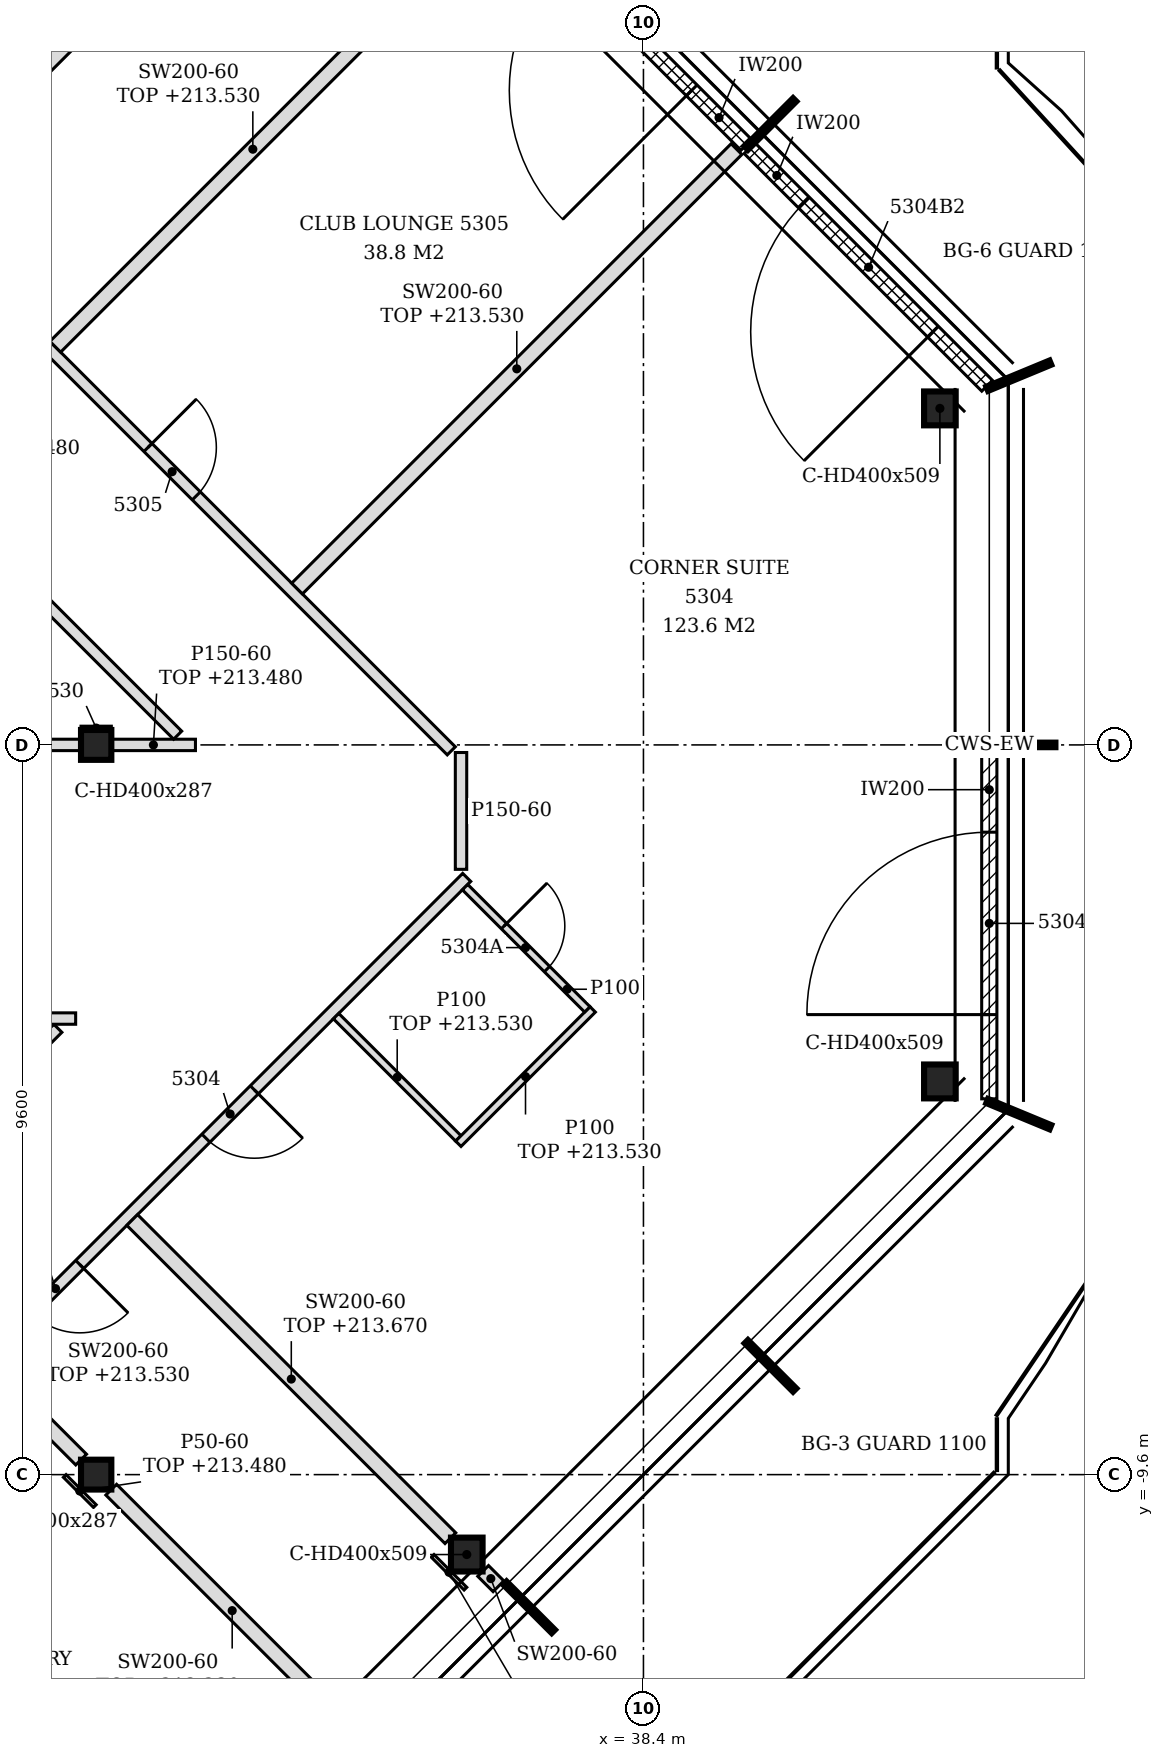
"""IFC4 building model, lengths in metres.
Left out: names, types, materials, properties, quantities, classifications, styles, units other than length and angle.
Written with IfcOpenShell. Run it as: python <this file> out.ifc"""

import sys

from ifc_helpers import new_model, si_unit, direction, frame, frame_2d, origin, origin_2d, place, context, subcontext, project, spatial, polyline, rectangle, i_section, outline, extrude, element, fill, save


model = new_model("IFC4")
c1 = context("Model", 3, precision=1e-05, world=origin(), true_north=direction((0.0, 1.0)))
c2 = subcontext(c1, "Body", "Model", "MODEL_VIEW")
j1 = project(units=[si_unit("LENGTHUNIT", "METRE"), si_unit("PLANEANGLEUNIT", "RADIAN")], contexts=[c1])
p1 = place(None, origin())
s1 = spatial("IfcSite", under=j1, at=p1, CompositionType="ELEMENT")
p2 = place(p1, origin())
s2 = spatial("IfcBuilding", under=s1, at=p2, CompositionType="ELEMENT")
p3 = place(p2, frame((0.0, 0.0, 210.6)))
s3 = spatial("IfcBuildingStorey", under=s2, at=p3, CompositionType="ELEMENT", Elevation=210.6)
for number, where, z_axis, x_axis in (
    (1, (36.076, -10.652, -0.15), (0.0, 0.0, 1.0), (1.0, 0.0, 0.0)),
    (2, (42.3, -4.427, -0.15), (0.0, 0.0, 1.0), (1.0, 0.0, 0.0)),
    (3, (42.3, 4.427, -0.15), (0.0, 0.0, 1.0), (1.0, 0.0, 0.0)),
):
    element("IfcColumn", number, at=place(p3, frame(where, z_axis=z_axis, x_axis=x_axis)), inside=s3, PredefinedType="COLUMN", context=c2, shape_type="SweptSolid", body=[
        extrude(i_section(OverallWidth=0.416, OverallDepth=0.446, WebThickness=0.039, FlangeThickness=0.063, FilletRadius=0.015, at=origin_2d()), origin(), (0.0, 0.0, 1.0), 3.6),
    ])
for number, where, z_axis, x_axis in (
    (4, (31.2, -9.6, -0.15), (0.0, 0.0, 1.0), (1.0, 0.0, 0.0)),
    (5, (31.2, 0.0, -0.15), (0.0, 0.0, 1.0), (1.0, 0.0, 0.0)),
):
    element("IfcColumn", number, at=place(p3, frame(where, z_axis=z_axis, x_axis=x_axis)), inside=s3, PredefinedType="COLUMN", context=c2, shape_type="SweptSolid", body=[
        extrude(i_section(OverallWidth=0.399, OverallDepth=0.393, WebThickness=0.023, FlangeThickness=0.037, FilletRadius=0.015, at=origin_2d()), origin(), (0.0, 0.0, 1.0), 3.6),
    ])
p4 = place(p3, frame((42.95, -4.656, 0.0), z_axis=(0.0, 0.0, 1.0), x_axis=(0.0, 1.0, 0.0)))
e6 = element("IfcWall", 6, at=p4, inside=s3, PredefinedType="NOTDEFINED", context=c2, shape_type="SweptSolid", body=[
    extrude(rectangle(XDim=4.626, YDim=0.2, at=frame_2d((2.313, 0.0))), origin(), (0.0, 0.0, 1.0), 3.45),
])
p5 = place(p4, frame((1.108, 0.0, 0.0)))
e7 = element("IfcOpeningElement", 7, at=p5, cuts=e6, PredefinedType="OPENING", context=c2, shape_type="SweptSolid", body=[
    extrude(rectangle(XDim=2.4, YDim=2.4, at=frame_2d((1.2, 1.2))), frame((0.0, 0.11, 0.0), z_axis=(0.0, -1.0, 0.0), x_axis=(1.0, 0.0, 0.0)), (0.0, 0.0, 1.0), 0.22),
])
p6 = place(p3, frame((42.922, 4.725, 0.0), z_axis=(0.0, 0.0, 1.0), x_axis=(-0.707079168996, 0.707134392299, 0.0)))
e8 = element("IfcWall", 8, at=p6, inside=s3, PredefinedType="NOTDEFINED", context=c2, shape_type="SweptSolid", body=[
    extrude(rectangle(XDim=4.421, YDim=0.2, at=frame_2d((2.21, 0.0))), origin(), (0.0, 0.0, 1.0), 3.45),
])
p7 = place(p6, frame((1.005, 0.0, 0.0)))
e9 = element("IfcOpeningElement", 9, at=p7, cuts=e8, PredefinedType="OPENING", context=c2, shape_type="SweptSolid", body=[
    extrude(rectangle(XDim=2.4, YDim=2.4, at=frame_2d((1.2, 1.2))), frame((0.0, 0.11, 0.0), z_axis=(0.0, -1.0, 0.0), x_axis=(1.0, 0.0, 0.0)), (0.0, 0.0, 1.0), 0.22),
])
p8 = place(p3, frame((39.753, 7.893, 0.0), z_axis=(0.0, 0.0, 1.0), x_axis=(-0.707106781187, 0.707106781187, 0.0)))
e10 = element("IfcWall", 10, at=p8, inside=s3, PredefinedType="NOTDEFINED", context=c2, shape_type="SweptSolid", body=[
    extrude(rectangle(XDim=4.431, YDim=0.2, at=frame_2d((2.215, 0.0))), origin(), (0.0, 0.0, 1.0), 3.45),
])
p9 = place(p8, frame((1.016, 0.0, 0.0)))
e11 = element("IfcOpeningElement", 11, at=p9, cuts=e10, PredefinedType="OPENING", context=c2, shape_type="SweptSolid", body=[
    extrude(rectangle(XDim=2.4, YDim=2.4, at=frame_2d((1.2, 1.2))), frame((0.0, 0.11, 0.0), z_axis=(0.0, -1.0, 0.0), x_axis=(1.0, 0.0, 0.0)), (0.0, 0.0, 1.0), 0.22),
])
p10 = place(p3, frame((21.146, -16.672, 0.0), z_axis=(0.0, 0.0, 1.0), x_axis=(0.707100999376, 0.70711256295, 0.0)))
e12 = element("IfcWall", 12, at=p10, inside=s3, PredefinedType="PARTITIONING", context=c2, shape_type="SweptSolid", body=[
    extrude(rectangle(XDim=21.113, YDim=0.15, at=frame_2d((10.556, 0.0))), origin(), (0.0, 0.0, 1.0), 2.88),
])
p11 = place(p10, frame((2.466, 0.0, 0.0)))
e13 = element("IfcOpeningElement", 13, at=p11, cuts=e12, PredefinedType="OPENING", context=c2, shape_type="SweptSolid", body=[
    extrude(rectangle(XDim=0.9, YDim=2.1, at=frame_2d((0.45, 1.05))), frame((0.0, 0.085, 0.0), z_axis=(0.0, -1.0, 0.0), x_axis=(1.0, 0.0, 0.0)), (0.0, 0.0, 1.0), 0.17),
])
p12 = place(p10, frame((8.611, 0.0, 0.0)))
e14 = element("IfcOpeningElement", 14, at=p12, cuts=e12, PredefinedType="OPENING", context=c2, shape_type="SweptSolid", body=[
    extrude(rectangle(XDim=0.9, YDim=2.1, at=frame_2d((0.45, 1.05))), frame((0.0, 0.085, 0.0), z_axis=(0.0, -1.0, 0.0), x_axis=(1.0, 0.0, 0.0)), (0.0, 0.0, 1.0), 0.17),
])
p13 = place(p10, frame((13.012, 0.0, 0.0)))
e15 = element("IfcOpeningElement", 15, at=p13, cuts=e12, PredefinedType="OPENING", context=c2, shape_type="SweptSolid", body=[
    extrude(rectangle(XDim=0.9, YDim=2.1, at=frame_2d((0.45, 1.05))), frame((0.0, 0.085, 0.0), z_axis=(0.0, -1.0, 0.0), x_axis=(1.0, 0.0, 0.0)), (0.0, 0.0, 1.0), 0.17),
])
p14 = place(p10, frame((16.261, 0.0, 0.0)))
e16 = element("IfcOpeningElement", 16, at=p14, cuts=e12, PredefinedType="OPENING", context=c2, shape_type="SweptSolid", body=[
    extrude(rectangle(XDim=0.9, YDim=2.1, at=frame_2d((0.45, 1.05))), frame((0.0, 0.085, 0.0), z_axis=(0.0, -1.0, 0.0), x_axis=(1.0, 0.0, 0.0)), (0.0, 0.0, 1.0), 0.17),
])
p15 = place(p3, frame((34.581, -12.981, 0.0), z_axis=(0.0, 0.0, 1.0), x_axis=(-0.707133900936, 0.707079660397, 0.0)))
e17 = element("IfcWall", 17, at=p15, inside=s3, PredefinedType="PARTITIONING", context=c2, shape_type="SweptSolid", body=[
    extrude(rectangle(XDim=4.501, YDim=0.2, at=frame_2d((2.25, 0.0))), origin(), (0.0, 0.0, 1.0), 2.63),
])
p16 = place(p3, frame((36.493, -11.069, 0.0), z_axis=(0.0, 0.0, 1.0), x_axis=(-0.707534423513, 0.706678880075, 0.0)))
e18 = element("IfcWall", 18, at=p16, inside=s3, PredefinedType="PARTITIONING", context=c2, shape_type="SweptSolid", body=[
    extrude(rectangle(XDim=0.285, YDim=0.2, at=frame_2d((0.143, 0.0))), origin(), (0.0, 0.0, 1.0), 3.45),
])
p17 = place(p3, frame((35.86, -10.436, 0.0), z_axis=(0.0, 0.0, 1.0), x_axis=(-0.707106781187, 0.707106781187, 0.0)))
e19 = element("IfcWall", 19, at=p17, inside=s3, PredefinedType="PARTITIONING", context=c2, shape_type="SweptSolid", body=[
    extrude(rectangle(XDim=5.92, YDim=0.2, at=frame_2d((2.96, 0.0))), origin(), (0.0, 0.0, 1.0), 3.07),
])
p18 = place(p3, frame((31.002, -9.402, 0.0), z_axis=(0.0, 0.0, 1.0), x_axis=(-0.707106781187, 0.707106781187, 0.0)))
e20 = element("IfcWall", 20, at=p18, inside=s3, PredefinedType="PARTITIONING", context=c2, shape_type="SweptSolid", body=[
    extrude(rectangle(XDim=1.754, YDim=0.2, at=frame_2d((0.877, 0.0))), origin(), (0.0, 0.0, 1.0), 2.93),
])
p19 = place(p3, frame((26.151, -8.272, 0.0), z_axis=(0.0, 0.0, 1.0), x_axis=(0.707163762272, 0.707049795509, 0.0)))
e21 = element("IfcWall", 21, at=p19, inside=s3, PredefinedType="PARTITIONING", context=c2, shape_type="SweptSolid", body=[
    extrude(rectangle(XDim=6.427, YDim=0.15, at=frame_2d((3.213, 0.0))), origin(), (0.0, 0.0, 1.0), 2.88),
])
p20 = place(p3, frame((35.965, -5.177, 0.0), z_axis=(0.0, 0.0, 1.0), x_axis=(-0.707160441348, 0.707053116953, 0.0)))
e22 = element("IfcWall", 22, at=p20, inside=s3, PredefinedType="PARTITIONING", context=c2, shape_type="SweptSolid", body=[
    extrude(rectangle(XDim=2.275, YDim=0.1, at=frame_2d((1.137, 0.0))), origin(), (0.0, 0.0, 1.0), 2.93),
])
p21 = place(p3, frame((35.965, -5.247, 0.0), z_axis=(0.0, 0.0, 1.0), x_axis=(0.707155609469, 0.707057949532, 0.0)))
e23 = element("IfcWall", 23, at=p21, inside=s3, PredefinedType="PARTITIONING", context=c2, shape_type="SweptSolid", body=[
    extrude(rectangle(XDim=2.5, YDim=0.1, at=frame_2d((1.25, 0.0))), origin(), (0.0, 0.0, 1.0), 2.93),
])
p22 = place(p3, frame((19.125, -3.6, 0.0), z_axis=(0.0, 0.0, 1.0), x_axis=(1.0, 0.0, 0.0)))
e24 = element("IfcWall", 24, at=p22, inside=s3, PredefinedType="PARTITIONING", context=c2, shape_type="SweptSolid", body=[
    extrude(outline(polyline([(0.0, 0.0), (11.805, 0.0), (11.805, 3.45), (0.225, 3.45), (0.223, 2.83), (0.0, 2.83), (0.0, 0.0)])), frame((0.0, 0.075, 0.0), z_axis=(0.0, -1.0, 0.0), x_axis=(1.0, 0.0, 0.0)), (0.0, 0.0, 1.0), 0.15),
])
p23 = place(p22, frame((5.437, 0.0, 0.0)))
e25 = element("IfcOpeningElement", 25, at=p23, cuts=e24, PredefinedType="OPENING", context=c2, shape_type="SweptSolid", body=[
    extrude(rectangle(XDim=0.9, YDim=2.1, at=frame_2d((0.45, 1.05))), frame((0.0, 0.085, 0.0), z_axis=(0.0, -1.0, 0.0), x_axis=(1.0, 0.0, 0.0)), (0.0, 0.0, 1.0), 0.17),
])
p24 = place(p3, frame((37.662, -3.479, 0.0), z_axis=(0.0, 0.0, 1.0), x_axis=(-0.707160441348, 0.707053116953, 0.0)))
e26 = element("IfcWall", 26, at=p24, inside=s3, PredefinedType="PARTITIONING", context=c2, shape_type="SweptSolid", body=[
    extrude(rectangle(XDim=2.275, YDim=0.1, at=frame_2d((1.137, 0.0))), origin(), (0.0, 0.0, 1.0), 3.45),
])
p25 = place(p24, frame((0.75, 0.0, 0.0)))
e27 = element("IfcOpeningElement", 27, at=p25, cuts=e26, PredefinedType="OPENING", context=c2, shape_type="SweptSolid", body=[
    extrude(rectangle(XDim=0.8, YDim=2.1, at=frame_2d((0.4, 1.05))), frame((0.0, 0.06, 0.0), z_axis=(0.0, -1.0, 0.0), x_axis=(1.0, 0.0, 0.0)), (0.0, 0.0, 1.0), 0.12),
])
p26 = place(p3, frame((36.0, -1.637, 0.0), z_axis=(0.0, 0.0, 1.0), x_axis=(0.0, 1.0, 0.0)))
e28 = element("IfcWall", 28, at=p26, inside=s3, PredefinedType="PARTITIONING", context=c2, shape_type="SweptSolid", body=[
    extrude(outline(polyline([(0.0, 0.0), (1.537, 0.0), (1.537, 2.88), (1.532, 2.88), (1.53, 3.45), (0.0, 3.45), (0.0, 0.0)])), frame((0.0, 0.075, 0.0), z_axis=(0.0, -1.0, 0.0), x_axis=(1.0, 0.0, 0.0)), (0.0, 0.0, 1.0), 0.15),
])
p27 = place(p3, frame((35.872, -0.078, 0.0), z_axis=(0.0, 0.0, 1.0), x_axis=(-0.707113345155, 0.707100217157, 0.0)))
e29 = element("IfcWall", 29, at=p27, inside=s3, PredefinedType="PARTITIONING", context=c2, shape_type="SweptSolid", body=[
    extrude(rectangle(XDim=18.597, YDim=0.15, at=frame_2d((9.298, 0.0))), origin(), (0.0, 0.0, 1.0), 2.88),
])
p28 = place(p27, frame((4.744, 0.0, 0.0)))
e30 = element("IfcOpeningElement", 30, at=p28, cuts=e29, PredefinedType="OPENING", context=c2, shape_type="SweptSolid", body=[
    extrude(rectangle(XDim=0.9, YDim=2.1, at=frame_2d((0.45, 1.05))), frame((0.0, 0.085, 0.0), z_axis=(0.0, -1.0, 0.0), x_axis=(1.0, 0.0, 0.0)), (0.0, 0.0, 1.0), 0.17),
])
p29 = place(p27, frame((8.345, 0.0, 0.0)))
e31 = element("IfcOpeningElement", 31, at=p29, cuts=e29, PredefinedType="OPENING", context=c2, shape_type="SweptSolid", body=[
    extrude(rectangle(XDim=0.9, YDim=2.1, at=frame_2d((0.45, 1.05))), frame((0.0, 0.085, 0.0), z_axis=(0.0, -1.0, 0.0), x_axis=(1.0, 0.0, 0.0)), (0.0, 0.0, 1.0), 0.17),
])
p30 = place(p27, frame((12.746, 0.0, 0.0)))
e32 = element("IfcOpeningElement", 32, at=p30, cuts=e29, PredefinedType="OPENING", context=c2, shape_type="SweptSolid", body=[
    extrude(rectangle(XDim=0.9, YDim=2.1, at=frame_2d((0.45, 1.05))), frame((0.0, 0.085, 0.0), z_axis=(0.0, -1.0, 0.0), x_axis=(1.0, 0.0, 0.0)), (0.0, 0.0, 1.0), 0.17),
])
p31 = place(p3, frame((19.125, 0.0, 0.0), z_axis=(0.0, 0.0, 1.0), x_axis=(1.0, 0.0, 0.0)))
e33 = element("IfcWall", 33, at=p31, inside=s3, PredefinedType="PARTITIONING", context=c2, shape_type="SweptSolid", body=[
    extrude(outline(polyline([(0.0, 0.0), (11.875, 0.0), (11.875, 2.88), (0.225, 2.88), (0.223, 2.83), (0.0, 2.83), (0.0, 0.0)])), frame((0.0, 0.075, 0.0), z_axis=(0.0, -1.0, 0.0), x_axis=(1.0, 0.0, 0.0)), (0.0, 0.0, 1.0), 0.15),
])
p32 = place(p3, frame((31.399, 0.0, 0.0), z_axis=(0.0, 0.0, 1.0), x_axis=(1.0, 0.0, 0.0)))
e34 = element("IfcWall", 34, at=p32, inside=s3, PredefinedType="PARTITIONING", context=c2, shape_type="SweptSolid", body=[
    extrude(rectangle(XDim=1.107, YDim=0.15, at=frame_2d((0.553, 0.0))), origin(), (0.0, 0.0, 1.0), 2.88),
])
p33 = place(p3, frame((32.272, 0.128, 0.0), z_axis=(0.0, 0.0, 1.0), x_axis=(-0.707106781187, 0.707106781187, 0.0)))
e35 = element("IfcWall", 35, at=p33, inside=s3, PredefinedType="PARTITIONING", context=c2, shape_type="SweptSolid", body=[
    extrude(rectangle(XDim=18.207, YDim=0.15, at=frame_2d((9.103, 0.0))), origin(), (0.0, 0.0, 1.0), 2.88),
])
p34 = place(p33, frame((8.703, 0.0, 0.0)))
e36 = element("IfcOpeningElement", 36, at=p34, cuts=e35, PredefinedType="OPENING", context=c2, shape_type="SweptSolid", body=[
    extrude(rectangle(XDim=0.9, YDim=2.1, at=frame_2d((0.45, 1.05))), frame((0.0, 0.085, 0.0), z_axis=(0.0, -1.0, 0.0), x_axis=(1.0, 0.0, 0.0)), (0.0, 0.0, 1.0), 0.17),
])
p35 = place(p3, frame((33.843, 2.057, 0.0), z_axis=(0.0, 0.0, 1.0), x_axis=(0.70709185088, 0.707121711178, 0.0)))
e37 = element("IfcWall", 37, at=p35, inside=s3, PredefinedType="PARTITIONING", context=c2, shape_type="SweptSolid", body=[
    extrude(rectangle(XDim=8.176, YDim=0.2, at=frame_2d((4.088, 0.0))), origin(), (0.0, 0.0, 1.0), 2.93),
])
p36 = place(p3, frame((30.662, 5.238, 0.0), z_axis=(0.0, 0.0, 1.0), x_axis=(0.707106781187, 0.707106781187, 0.0)))
e38 = element("IfcWall", 38, at=p36, inside=s3, PredefinedType="PARTITIONING", context=c2, shape_type="SweptSolid", body=[
    extrude(rectangle(XDim=7.351, YDim=0.2, at=frame_2d((3.676, 0.0))), origin(), (0.0, 0.0, 1.0), 2.93),
])
p37 = place(p3, frame((28.75, 7.15, 0.0), z_axis=(0.0, 0.0, 1.0), x_axis=(0.7070684525, 0.707145107796, 0.0)))
e39 = element("IfcWall", 39, at=p37, inside=s3, PredefinedType="PARTITIONING", context=c2, shape_type="SweptSolid", body=[
    extrude(rectangle(XDim=3.185, YDim=0.2, at=frame_2d((1.592, 0.0))), origin(), (0.0, 0.0, 1.0), 2.93),
])
p38 = place(p3, frame((31.182, -10.014, 0.0), z_axis=(0.0, 0.0, 1.0), x_axis=(-0.707106781187, 0.707106781187, 0.0)))
e40 = element("IfcWall", 40, at=p38, inside=s3, PredefinedType="PARTITIONING", context=c2, shape_type="SweptSolid", body=[
    extrude(rectangle(XDim=0.56, YDim=0.05, at=frame_2d((0.28, 0.0))), origin(), (0.0, 0.0, 1.0), 2.88),
])
p39 = place(p3, frame((36.058, -11.1, 0.0), z_axis=(0.0, 0.0, 1.0), x_axis=(-0.707307009627, 0.706906496032, 0.0)))
e41 = element("IfcWall", 41, at=p39, inside=s3, PredefinedType="PARTITIONING", context=c2, shape_type="SweptSolid", body=[
    extrude(rectangle(XDim=0.61, YDim=0.05, at=frame_2d((0.305, 0.0))), origin(), (0.0, 0.0, 1.0), 2.63),
])
p40 = place(p3, frame((31.0, 0.221, 0.0), z_axis=(0.0, 0.0, 1.0), x_axis=(1.0, 0.0, 0.0)))
e42 = element("IfcWall", 42, at=p40, inside=s3, PredefinedType="PARTITIONING", context=c2, shape_type="SweptSolid", body=[
    extrude(rectangle(XDim=0.399, YDim=0.05, at=frame_2d((0.199, 0.0))), origin(), (0.0, 0.0, 1.0), 2.93),
])
p41 = place(p5, origin())
e43 = element("IfcDoor", 43, at=p41, inside=s3, OperationType="SINGLE_SWING_LEFT", PredefinedType="DOOR", context=c2, shape_type="SweptSolid", body=[
    extrude(rectangle(XDim=2.4, YDim=2.4, at=frame_2d((1.2, 1.2))), frame((0.0, 0.025, 0.0), z_axis=(0.0, -1.0, 0.0), x_axis=(1.0, 0.0, 0.0)), (0.0, 0.0, 1.0), 0.05),
])
fill(e7, e43)
p42 = place(p7, origin())
e44 = element("IfcDoor", 44, at=p42, inside=s3, OperationType="SINGLE_SWING_LEFT", PredefinedType="DOOR", context=c2, shape_type="SweptSolid", body=[
    extrude(rectangle(XDim=2.4, YDim=2.4, at=frame_2d((1.2, 1.2))), frame((0.0, 0.025, 0.0), z_axis=(0.0, -1.0, 0.0), x_axis=(1.0, 0.0, 0.0)), (0.0, 0.0, 1.0), 0.05),
])
fill(e9, e44)
p43 = place(p9, origin())
e45 = element("IfcDoor", 45, at=p43, inside=s3, OperationType="SINGLE_SWING_LEFT", PredefinedType="DOOR", context=c2, shape_type="SweptSolid", body=[
    extrude(rectangle(XDim=2.4, YDim=2.4, at=frame_2d((1.2, 1.2))), frame((0.0, 0.025, 0.0), z_axis=(0.0, -1.0, 0.0), x_axis=(1.0, 0.0, 0.0)), (0.0, 0.0, 1.0), 0.05),
])
fill(e11, e45)
p44 = place(p13, frame((0.9, 0.0, 0.0), z_axis=(0.0, 0.0, 1.0), x_axis=(-1.0, 0.0, 0.0)))
e46 = element("IfcDoor", 46, at=p44, inside=s3, OperationType="SINGLE_SWING_LEFT", PredefinedType="DOOR", context=c2, shape_type="SweptSolid", body=[
    extrude(rectangle(XDim=0.9, YDim=2.1, at=frame_2d((0.45, 1.05))), frame((0.0, 0.025, 0.0), z_axis=(0.0, -1.0, 0.0), x_axis=(1.0, 0.0, 0.0)), (0.0, 0.0, 1.0), 0.05),
])
fill(e15, e46)
p45 = place(p14, frame((0.9, 0.0, 0.0), z_axis=(0.0, 0.0, 1.0), x_axis=(-1.0, 0.0, 0.0)))
e47 = element("IfcDoor", 47, at=p45, inside=s3, OperationType="SINGLE_SWING_LEFT", PredefinedType="DOOR", context=c2, shape_type="SweptSolid", body=[
    extrude(rectangle(XDim=0.9, YDim=2.1, at=frame_2d((0.45, 1.05))), frame((0.0, 0.025, 0.0), z_axis=(0.0, -1.0, 0.0), x_axis=(1.0, 0.0, 0.0)), (0.0, 0.0, 1.0), 0.05),
])
fill(e16, e47)
p46 = place(p25, frame((0.8, 0.0, 0.0), z_axis=(0.0, 0.0, 1.0), x_axis=(-1.0, 0.0, 0.0)))
e48 = element("IfcDoor", 48, at=p46, inside=s3, OperationType="SINGLE_SWING_LEFT", PredefinedType="DOOR", context=c2, shape_type="SweptSolid", body=[
    extrude(rectangle(XDim=0.8, YDim=2.1, at=frame_2d((0.4, 1.05))), frame((0.0, 0.025, 0.0), z_axis=(0.0, -1.0, 0.0), x_axis=(1.0, 0.0, 0.0)), (0.0, 0.0, 1.0), 0.05),
])
fill(e27, e48)
p47 = place(p28, frame((0.9, 0.0, 0.0), z_axis=(0.0, 0.0, 1.0), x_axis=(-1.0, 0.0, 0.0)))
e49 = element("IfcDoor", 49, at=p47, inside=s3, OperationType="SINGLE_SWING_LEFT", PredefinedType="DOOR", context=c2, shape_type="SweptSolid", body=[
    extrude(rectangle(XDim=0.9, YDim=2.1, at=frame_2d((0.45, 1.05))), frame((0.0, 0.025, 0.0), z_axis=(0.0, -1.0, 0.0), x_axis=(1.0, 0.0, 0.0)), (0.0, 0.0, 1.0), 0.05),
])
fill(e30, e49)
save(model, sys.argv[1])
